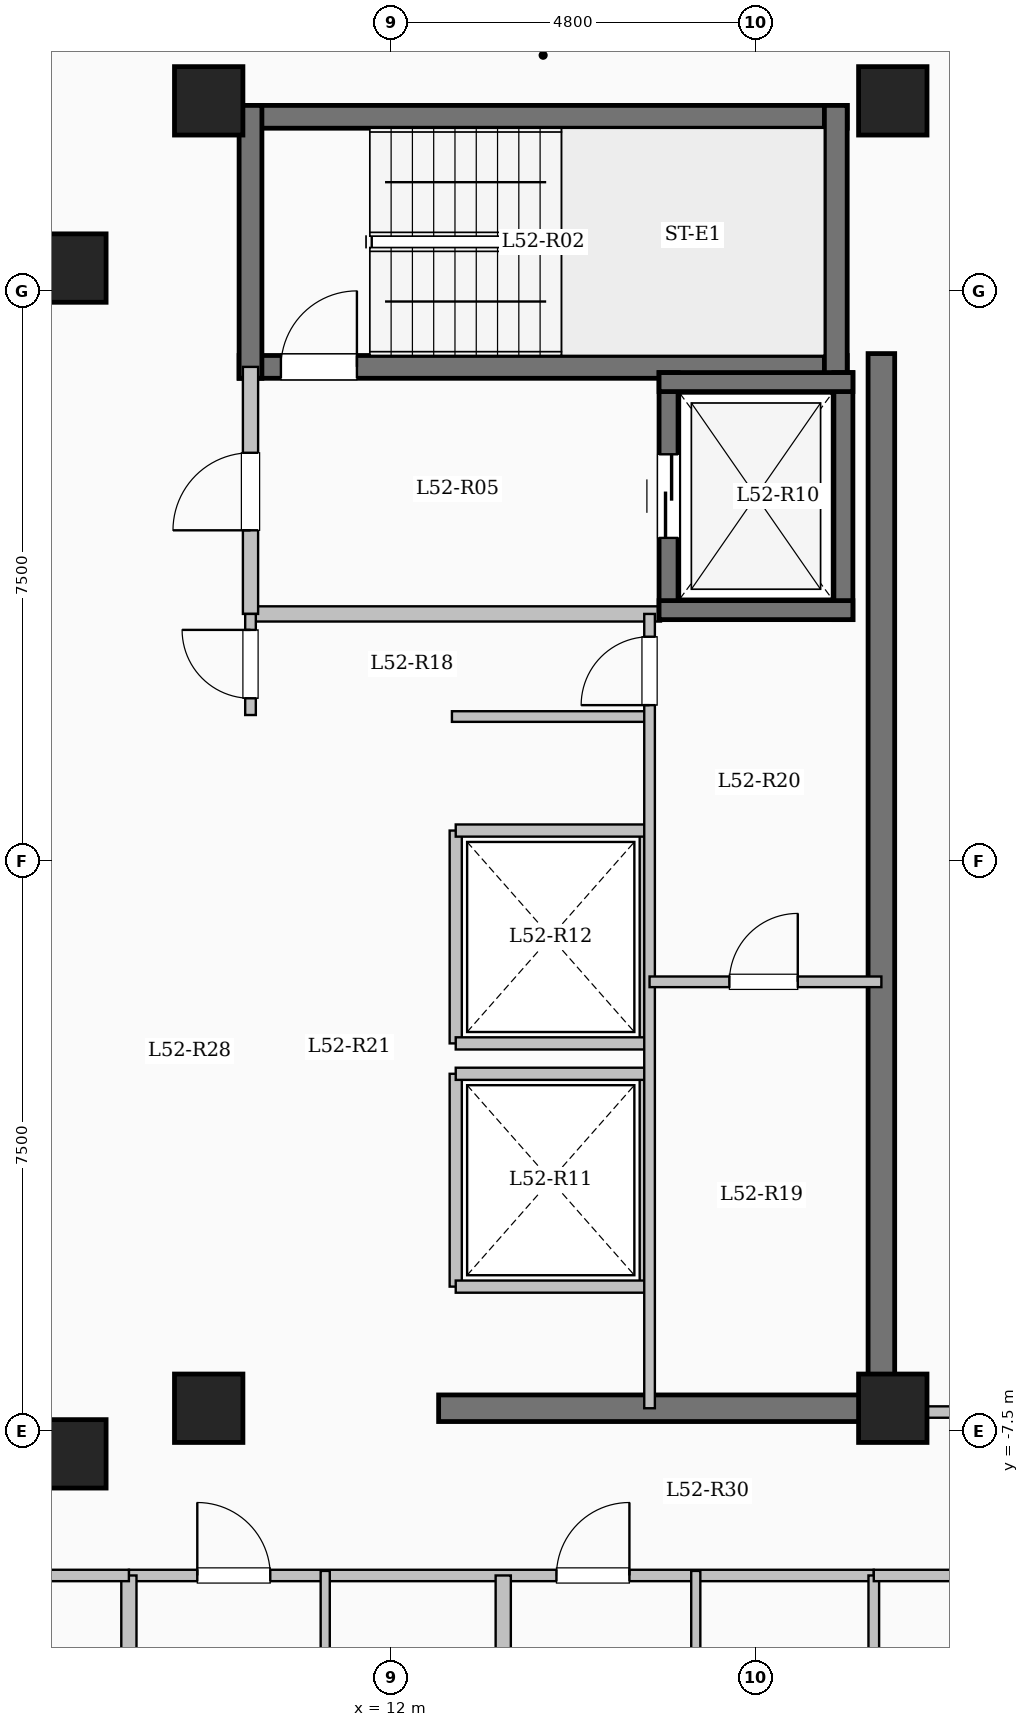
"""IFC4 building model, lengths in metres.
Left out: names, types, materials, properties, quantities, classifications, styles, units other than length and angle.
Written with IfcOpenShell. Run it as: python <this file> out.ifc"""

import sys

from ifc_helpers import new_model, si_unit, direction, frame, frame_2d, origin, origin_2d, place, context, subcontext, project, spatial, rectangle, extrude, element, fill, save


model = new_model("IFC4")
c1 = context("Model", 3, precision=1e-05, world=origin(), true_north=direction((0.0, 1.0)))
c2 = subcontext(c1, "Body", "Model", "MODEL_VIEW")
j1 = project(units=[si_unit("LENGTHUNIT", "METRE"), si_unit("PLANEANGLEUNIT", "RADIAN")], contexts=[c1])
p1 = place(None, origin())
s1 = spatial("IfcSite", under=j1, at=p1, CompositionType="ELEMENT")
p2 = place(p1, origin())
s2 = spatial("IfcBuilding", under=s1, at=p2, CompositionType="ELEMENT")
p3 = place(p2, frame((0.0, 0.0, 193.6)))
s3 = spatial("IfcBuildingStorey", under=s2, at=p3, CompositionType="ELEMENT", Elevation=193.6)
for number, where, z_axis, x_axis in (
    (1, (7.8, -7.8, 0.0), (0.0, 0.0, 1.0), (1.0, 0.0, 0.0)),
    (2, (7.8, 7.8, 0.0), (0.0, 0.0, 1.0), (1.0, 0.0, 0.0)),
    (3, (9.6, -7.2, 0.0), (0.0, 0.0, 1.0), (1.0, 0.0, 0.0)),
    (4, (9.6, 10.0, 0.0), (0.0, 0.0, 1.0), (1.0, 0.0, 0.0)),
    (5, (18.6, -7.2, 0.0), (0.0, 0.0, 1.0), (1.0, 0.0, 0.0)),
    (6, (18.6, 10.0, 0.0), (0.0, 0.0, 1.0), (1.0, 0.0, 0.0)),
):
    element("IfcColumn", number, at=place(p3, frame(where, z_axis=z_axis, x_axis=x_axis)), inside=s3, PredefinedType="COLUMN", context=c2, shape_type="SweptSolid", body=[
        extrude(rectangle(XDim=0.9, YDim=0.9, at=origin_2d()), origin(), (0.0, 0.0, 1.0), 3.35),
    ])
p4 = place(p3, frame((10.0, 9.79, 0.0), z_axis=(0.0, 0.0, 1.0), x_axis=(1.0, 0.0, 0.0)))
e7 = element("IfcWall", 7, at=p4, inside=s3, PredefinedType="SHEAR", context=c2, shape_type="SweptSolid", body=[
    extrude(rectangle(XDim=8.0, YDim=0.3, at=frame_2d((4.0, 0.0))), origin(), (0.0, 0.0, 1.0), 3.35),
])
p5 = place(p3, frame((10.0, 6.5, 0.0), z_axis=(0.0, 0.0, 1.0), x_axis=(1.0, 0.0, 0.0)))
e8 = element("IfcWall", 8, at=p5, inside=s3, PredefinedType="SHEAR", context=c2, shape_type="SweptSolid", body=[
    extrude(rectangle(XDim=8.0, YDim=0.3, at=frame_2d((4.0, 0.0))), origin(), (0.0, 0.0, 1.0), 3.35),
])
p6 = place(p5, frame((0.55, 0.0, 0.0)))
e9 = element("IfcOpeningElement", 9, at=p6, cuts=e8, PredefinedType="OPENING", context=c2, shape_type="SweptSolid", body=[
    extrude(rectangle(XDim=1.0, YDim=2.15, at=frame_2d((0.5, 1.075))), frame((0.0, 0.16, 0.0), z_axis=(0.0, -1.0, 0.0), x_axis=(1.0, 0.0, 0.0)), (0.0, 0.0, 1.0), 0.32),
])
for number, where, z_axis, x_axis in (
    (10, (10.15, 6.35, 0.0), (0.0, 0.0, 1.0), (0.0, 1.0, 0.0)),
    (11, (17.85, 6.35, 0.0), (0.0, 0.0, 1.0), (0.0, 1.0, 0.0)),
):
    element("IfcWall", number, at=place(p3, frame(where, z_axis=z_axis, x_axis=x_axis)), inside=s3, PredefinedType="SHEAR", context=c2, shape_type="SweptSolid", body=[
        extrude(rectangle(XDim=3.59, YDim=0.3, at=frame_2d((1.795, 0.0))), origin(), (0.0, 0.0, 1.0), 3.35),
    ])
p7 = place(p3, frame((10.15, 3.25, 0.0), z_axis=(0.0, 0.0, 1.0), x_axis=(1.0, 0.0, 0.0)))
e12 = element("IfcWall", 12, at=p7, inside=s3, PredefinedType="SOLIDWALL", context=c2, shape_type="SweptSolid", body=[
    extrude(rectangle(XDim=5.4, YDim=0.2, at=frame_2d((2.7, 0.0))), origin(), (0.0, 0.0, 1.0), 3.1),
])
p8 = place(p3, frame((10.15, 3.25, 0.0), z_axis=(0.0, 0.0, 1.0), x_axis=(0.0, 1.0, 0.0)))
e13 = element("IfcWall", 13, at=p8, inside=s3, PredefinedType="SOLIDWALL", context=c2, shape_type="SweptSolid", body=[
    extrude(rectangle(XDim=3.25, YDim=0.2, at=frame_2d((1.625, 0.0))), origin(), (0.0, 0.0, 1.0), 3.1),
])
p9 = place(p8, frame((1.1, 0.0, 0.0)))
e14 = element("IfcOpeningElement", 14, at=p9, cuts=e13, PredefinedType="OPENING", context=c2, shape_type="SweptSolid", body=[
    extrude(rectangle(XDim=1.02, YDim=2.15, at=frame_2d((0.51, 1.075))), frame((0.0, 0.11, 0.0), z_axis=(0.0, -1.0, 0.0), x_axis=(1.0, 0.0, 0.0)), (0.0, 0.0, 1.0), 0.22),
])
p10 = place(p3, frame((15.65, 3.175, 0.0), z_axis=(0.0, 0.0, 1.0), x_axis=(0.0, 1.0, 0.0)))
e15 = element("IfcWall", 15, at=p10, inside=s3, PredefinedType="SHEAR", context=c2, shape_type="SweptSolid", body=[
    extrude(rectangle(XDim=3.25, YDim=0.25, at=frame_2d((1.625, 0.0))), origin(), (0.0, 0.0, 1.0), 3.35),
])
p11 = place(p10, frame((1.075, 0.0, 0.0)))
e16 = element("IfcOpeningElement", 16, at=p11, cuts=e15, PredefinedType="OPENING", context=c2, shape_type="SweptSolid", body=[
    extrude(rectangle(XDim=1.1, YDim=2.15, at=frame_2d((0.55, 1.075))), frame((0.0, 0.135, 0.0), z_axis=(0.0, -1.0, 0.0), x_axis=(1.0, 0.0, 0.0)), (0.0, 0.0, 1.0), 0.27),
])
p12 = place(p3, frame((17.95, 3.175, 0.0), z_axis=(0.0, 0.0, 1.0), x_axis=(0.0, 1.0, 0.0)))
e17 = element("IfcWall", 17, at=p12, inside=s3, PredefinedType="SHEAR", context=c2, shape_type="SweptSolid", body=[
    extrude(rectangle(XDim=3.25, YDim=0.25, at=frame_2d((1.625, 0.0))), origin(), (0.0, 0.0, 1.0), 3.35),
])
for number, where, z_axis, x_axis in (
    (18, (15.525, 3.3, 0.0), (0.0, 0.0, 1.0), (1.0, 0.0, 0.0)),
    (19, (15.525, 6.3, 0.0), (0.0, 0.0, 1.0), (1.0, 0.0, 0.0)),
):
    element("IfcWall", number, at=place(p3, frame(where, z_axis=z_axis, x_axis=x_axis)), inside=s3, PredefinedType="SHEAR", context=c2, shape_type="SweptSolid", body=[
        extrude(rectangle(XDim=2.55, YDim=0.25, at=frame_2d((1.275, 0.0))), origin(), (0.0, 0.0, 1.0), 3.35),
    ])
for number, where, z_axis, x_axis in (
    (20, (12.85, -5.6, 0.0), (0.0, 0.0, 1.0), (0.0, 1.0, 0.0)),
    (21, (15.35, -5.6, 0.0), (0.0, 0.0, 1.0), (0.0, 1.0, 0.0)),
):
    element("IfcWall", number, at=place(p3, frame(where, z_axis=z_axis, x_axis=x_axis)), inside=s3, PredefinedType="SOLIDWALL", context=c2, shape_type="SweptSolid", body=[
        extrude(rectangle(XDim=2.8, YDim=0.16, at=frame_2d((1.4, 0.0))), origin(), (0.0, 0.0, 1.0), 3.1),
    ])
for number, where, z_axis, x_axis in (
    (22, (12.85, -5.6, 0.0), (0.0, 0.0, 1.0), (1.0, 0.0, 0.0)),
    (23, (12.85, -2.8, 0.0), (0.0, 0.0, 1.0), (1.0, 0.0, 0.0)),
):
    element("IfcWall", number, at=place(p3, frame(where, z_axis=z_axis, x_axis=x_axis)), inside=s3, PredefinedType="SOLIDWALL", context=c2, shape_type="SweptSolid", body=[
        extrude(rectangle(XDim=2.5, YDim=0.16, at=frame_2d((1.25, 0.0))), origin(), (0.0, 0.0, 1.0), 3.1),
    ])
for number, where, z_axis, x_axis in (
    (24, (12.85, -2.4, 0.0), (0.0, 0.0, 1.0), (0.0, 1.0, 0.0)),
    (25, (15.35, -2.4, 0.0), (0.0, 0.0, 1.0), (0.0, 1.0, 0.0)),
):
    element("IfcWall", number, at=place(p3, frame(where, z_axis=z_axis, x_axis=x_axis)), inside=s3, PredefinedType="SOLIDWALL", context=c2, shape_type="SweptSolid", body=[
        extrude(rectangle(XDim=2.8, YDim=0.16, at=frame_2d((1.4, 0.0))), origin(), (0.0, 0.0, 1.0), 3.1),
    ])
for number, where, z_axis, x_axis in (
    (26, (12.85, -2.4, 0.0), (0.0, 0.0, 1.0), (1.0, 0.0, 0.0)),
    (27, (12.85, 0.4, 0.0), (0.0, 0.0, 1.0), (1.0, 0.0, 0.0)),
):
    element("IfcWall", number, at=place(p3, frame(where, z_axis=z_axis, x_axis=x_axis)), inside=s3, PredefinedType="SOLIDWALL", context=c2, shape_type="SweptSolid", body=[
        extrude(rectangle(XDim=2.5, YDim=0.16, at=frame_2d((1.25, 0.0))), origin(), (0.0, 0.0, 1.0), 3.1),
    ])
p13 = place(p3, frame((18.45, -7.375, 0.0), z_axis=(0.0, 0.0, 1.0), x_axis=(0.0, 1.0, 0.0)))
e28 = element("IfcWall", 28, at=p13, inside=s3, PredefinedType="SHEAR", context=c2, shape_type="SweptSolid", body=[
    extrude(rectangle(XDim=14.05, YDim=0.35, at=frame_2d((7.025, 0.0))), origin(), (0.0, 0.0, 1.0), 3.35),
])
p14 = place(p3, frame((12.625, -7.2, 0.0), z_axis=(0.0, 0.0, 1.0), x_axis=(1.0, 0.0, 0.0)))
e29 = element("IfcWall", 29, at=p14, inside=s3, PredefinedType="SHEAR", context=c2, shape_type="SweptSolid", body=[
    extrude(rectangle(XDim=6.0, YDim=0.35, at=frame_2d((3.0, 0.0))), origin(), (0.0, 0.0, 1.0), 3.35),
])
p15 = place(p3, frame((12.8, 1.9, 0.0), z_axis=(0.0, 0.0, 1.0), x_axis=(1.0, 0.0, 0.0)))
e30 = element("IfcWall", 30, at=p15, inside=s3, PredefinedType="PARTITIONING", context=c2, shape_type="SweptSolid", body=[
    extrude(rectangle(XDim=2.6, YDim=0.14, at=frame_2d((1.3, 0.0))), origin(), (0.0, 0.0, 1.0), 3.1),
])
p16 = place(p3, frame((10.15, 1.92, 0.0), z_axis=(0.0, 0.0, 1.0), x_axis=(0.0, 1.0, 0.0)))
e31 = element("IfcWall", 31, at=p16, inside=s3, PredefinedType="PARTITIONING", context=c2, shape_type="SweptSolid", body=[
    extrude(rectangle(XDim=1.33, YDim=0.14, at=frame_2d((0.665, 0.0))), origin(), (0.0, 0.0, 1.0), 3.1),
])
p17 = place(p16, frame((0.22, 0.0, 0.0)))
e32 = element("IfcOpeningElement", 32, at=p17, cuts=e31, PredefinedType="OPENING", context=c2, shape_type="SweptSolid", body=[
    extrude(rectangle(XDim=0.9, YDim=2.08, at=frame_2d((0.45, 1.04))), frame((0.0, 0.08, 0.0), z_axis=(0.0, -1.0, 0.0), x_axis=(1.0, 0.0, 0.0)), (0.0, 0.0, 1.0), 0.16),
])
p18 = place(p3, frame((15.4, -7.2, 0.0), z_axis=(0.0, 0.0, 1.0), x_axis=(0.0, 1.0, 0.0)))
e33 = element("IfcWall", 33, at=p18, inside=s3, PredefinedType="PARTITIONING", context=c2, shape_type="SweptSolid", body=[
    extrude(rectangle(XDim=10.45, YDim=0.14, at=frame_2d((5.225, 0.0))), origin(), (0.0, 0.0, 1.0), 3.1),
])
p19 = place(p18, frame((9.25, 0.0, 0.0)))
e34 = element("IfcOpeningElement", 34, at=p19, cuts=e33, PredefinedType="OPENING", context=c2, shape_type="SweptSolid", body=[
    extrude(rectangle(XDim=0.9, YDim=2.08, at=frame_2d((0.45, 1.04))), frame((0.0, 0.08, 0.0), z_axis=(0.0, -1.0, 0.0), x_axis=(1.0, 0.0, 0.0)), (0.0, 0.0, 1.0), 0.16),
])
p20 = place(p3, frame((15.4, -1.59, 0.0), z_axis=(0.0, 0.0, 1.0), x_axis=(1.0, 0.0, 0.0)))
e35 = element("IfcWall", 35, at=p20, inside=s3, PredefinedType="PARTITIONING", context=c2, shape_type="SweptSolid", body=[
    extrude(rectangle(XDim=3.05, YDim=0.14, at=frame_2d((1.525, 0.0))), origin(), (0.0, 0.0, 1.0), 3.1),
])
p21 = place(p20, frame((1.05, 0.0, 0.0)))
e36 = element("IfcOpeningElement", 36, at=p21, cuts=e35, PredefinedType="OPENING", context=c2, shape_type="SweptSolid", body=[
    extrude(rectangle(XDim=0.9, YDim=2.08, at=frame_2d((0.45, 1.04))), frame((0.0, 0.08, 0.0), z_axis=(0.0, -1.0, 0.0), x_axis=(1.0, 0.0, 0.0)), (0.0, 0.0, 1.0), 0.16),
])
p22 = place(p3, frame((8.55, -9.4, 0.0), z_axis=(0.0, 0.0, 1.0), x_axis=(1.0, 0.0, 0.0)))
e37 = element("IfcWall", 37, at=p22, inside=s3, PredefinedType="PARTITIONING", context=c2, shape_type="SweptSolid", body=[
    extrude(rectangle(XDim=9.8, YDim=0.15, at=frame_2d((4.9, 0.0))), origin(), (0.0, 0.0, 1.0), 3.1),
])
p23 = place(p22, frame((0.9, 0.0, 0.0)))
e38 = element("IfcOpeningElement", 38, at=p23, cuts=e37, PredefinedType="OPENING", context=c2, shape_type="SweptSolid", body=[
    extrude(rectangle(XDim=0.96, YDim=2.15, at=frame_2d((0.48, 1.075))), frame((0.0, 0.085, 0.0), z_axis=(0.0, -1.0, 0.0), x_axis=(1.0, 0.0, 0.0)), (0.0, 0.0, 1.0), 0.17),
])
p24 = place(p22, frame((5.625, 0.0, 0.0)))
e39 = element("IfcOpeningElement", 39, at=p24, cuts=e37, PredefinedType="OPENING", context=c2, shape_type="SweptSolid", body=[
    extrude(rectangle(XDim=0.96, YDim=2.15, at=frame_2d((0.48, 1.075))), frame((0.0, 0.085, 0.0), z_axis=(0.0, -1.0, 0.0), x_axis=(1.0, 0.0, 0.0)), (0.0, 0.0, 1.0), 0.17),
])
p25 = place(p3, frame((13.475, -20.9, 0.0), z_axis=(0.0, 0.0, 1.0), x_axis=(0.0, 1.0, 0.0)))
e40 = element("IfcWall", 40, at=p25, inside=s3, PredefinedType="SOLIDWALL", context=c2, shape_type="SweptSolid", body=[
    extrude(rectangle(XDim=11.5, YDim=0.2, at=frame_2d((5.75, 0.0))), origin(), (0.0, 0.0, 1.0), 3.1),
])
p26 = place(p3, frame((11.133, -12.56, 0.0), z_axis=(0.0, 0.0, 1.0), x_axis=(0.0, 1.0, 0.0)))
e41 = element("IfcWall", 41, at=p26, inside=s3, PredefinedType="PARTITIONING", context=c2, shape_type="SweptSolid", body=[
    extrude(rectangle(XDim=3.22, YDim=0.12, at=frame_2d((1.61, 0.0))), origin(), (0.0, 0.0, 1.0), 3.1),
])
p27 = place(p26, frame((1.14, 0.0, 0.0)))
e42 = element("IfcOpeningElement", 42, at=p27, cuts=e41, PredefinedType="OPENING", context=c2, shape_type="SweptSolid", body=[
    extrude(rectangle(XDim=0.88, YDim=2.1, at=frame_2d((0.44, 1.05))), frame((0.0, 0.07, 0.0), z_axis=(0.0, -1.0, 0.0), x_axis=(1.0, 0.0, 0.0)), (0.0, 0.0, 1.0), 0.14),
])
p28 = place(p3, frame((16.008, -12.56, 0.0), z_axis=(0.0, 0.0, 1.0), x_axis=(0.0, 1.0, 0.0)))
e43 = element("IfcWall", 43, at=p28, inside=s3, PredefinedType="PARTITIONING", context=c2, shape_type="SweptSolid", body=[
    extrude(rectangle(XDim=3.22, YDim=0.12, at=frame_2d((1.61, 0.0))), origin(), (0.0, 0.0, 1.0), 3.1),
])
p29 = place(p28, frame((1.14, 0.0, 0.0)))
e44 = element("IfcOpeningElement", 44, at=p29, cuts=e43, PredefinedType="OPENING", context=c2, shape_type="SweptSolid", body=[
    extrude(rectangle(XDim=0.88, YDim=2.1, at=frame_2d((0.44, 1.05))), frame((0.0, 0.07, 0.0), z_axis=(0.0, -1.0, 0.0), x_axis=(1.0, 0.0, 0.0)), (0.0, 0.0, 1.0), 0.14),
])
p30 = place(p3, frame((8.55, -21.504, 0.0), z_axis=(0.0, 0.0, 1.0), x_axis=(0.0, 1.0, 0.0)))
e45 = element("IfcWall", 45, at=p30, inside=s3, PredefinedType="SOLIDWALL", context=c2, shape_type="SweptSolid", body=[
    extrude(rectangle(XDim=12.104, YDim=0.2, at=frame_2d((6.052, 0.0))), origin(), (0.0, 0.0, 1.0), 3.1),
])
p31 = place(p3, frame((-8.55, -9.4, 0.0), z_axis=(0.0, 0.0, 1.0), x_axis=(1.0, 0.0, 0.0)))
e46 = element("IfcWall", 46, at=p31, inside=s3, PredefinedType="PARTITIONING", context=c2, shape_type="SweptSolid", body=[
    extrude(rectangle(XDim=17.1, YDim=0.15, at=frame_2d((8.55, 0.0))), origin(), (0.0, 0.0, 1.0), 3.1),
])
p32 = place(p31, frame((1.9, 0.0, 0.0)))
e47 = element("IfcOpeningElement", 47, at=p32, cuts=e46, PredefinedType="OPENING", context=c2, shape_type="SweptSolid", body=[
    extrude(rectangle(XDim=0.95, YDim=2.15, at=frame_2d((0.475, 1.075))), frame((0.0, 0.085, 0.0), z_axis=(0.0, -1.0, 0.0), x_axis=(1.0, 0.0, 0.0)), (0.0, 0.0, 1.0), 0.17),
])
p33 = place(p31, frame((10.5, 0.0, 0.0)))
e48 = element("IfcOpeningElement", 48, at=p33, cuts=e46, PredefinedType="OPENING", context=c2, shape_type="SweptSolid", body=[
    extrude(rectangle(XDim=0.95, YDim=2.15, at=frame_2d((0.475, 1.075))), frame((0.0, 0.085, 0.0), z_axis=(0.0, -1.0, 0.0), x_axis=(1.0, 0.0, 0.0)), (0.0, 0.0, 1.0), 0.17),
])
p34 = place(p3, frame((18.45, -7.25, 0.0), z_axis=(0.0, 0.0, 1.0), x_axis=(1.0, 0.0, 0.0)))
e49 = element("IfcWall", 49, at=p34, inside=s3, PredefinedType="PARTITIONING", context=c2, shape_type="SweptSolid", body=[
    extrude(rectangle(XDim=5.13, YDim=0.15, at=frame_2d((2.565, 0.0))), origin(), (0.0, 0.0, 1.0), 3.1),
])
p35 = place(p34, frame((1.95, 0.0, 0.0)))
e50 = element("IfcOpeningElement", 50, at=p35, cuts=e49, PredefinedType="OPENING", context=c2, shape_type="SweptSolid", body=[
    extrude(rectangle(XDim=1.08, YDim=2.15, at=frame_2d((0.54, 1.075))), frame((0.0, 0.085, 0.0), z_axis=(0.0, -1.0, 0.0), x_axis=(1.0, 0.0, 0.0)), (0.0, 0.0, 1.0), 0.17),
])
p36 = place(p3, frame((18.35, -17.25, 0.0), z_axis=(0.0, 0.0, 1.0), x_axis=(0.0, 1.0, 0.0)))
e51 = element("IfcWall", 51, at=p36, inside=s3, PredefinedType="PARTITIONING", context=c2, shape_type="SweptSolid", body=[
    extrude(rectangle(XDim=7.85, YDim=0.14, at=frame_2d((3.925, 0.0))), origin(), (0.0, 0.0, 1.0), 3.1),
])
p37 = place(p3, frame((18.35, -9.4, 0.0), z_axis=(0.0, 0.0, 1.0), x_axis=(1.0, 0.0, 0.0)))
e52 = element("IfcWall", 52, at=p37, inside=s3, PredefinedType="PARTITIONING", context=c2, shape_type="SweptSolid", body=[
    extrude(rectangle(XDim=5.23, YDim=0.15, at=frame_2d((2.615, 0.0))), origin(), (0.0, 0.0, 1.0), 3.1),
])
p38 = place(p37, frame((2.14, 0.0, 0.0)))
e53 = element("IfcOpeningElement", 53, at=p38, cuts=e52, PredefinedType="OPENING", context=c2, shape_type="SweptSolid", body=[
    extrude(rectangle(XDim=0.95, YDim=2.15, at=frame_2d((0.475, 1.075))), frame((0.0, 0.085, 0.0), z_axis=(0.0, -1.0, 0.0), x_axis=(1.0, 0.0, 0.0)), (0.0, 0.0, 1.0), 0.17),
])
p39 = place(p6, origin())
e54 = element("IfcDoor", 54, at=p39, inside=s3, OperationType="SINGLE_SWING_RIGHT", PredefinedType="DOOR", context=c2, shape_type="SweptSolid", body=[
    extrude(rectangle(XDim=1.0, YDim=2.15, at=frame_2d((0.5, 1.075))), frame((0.0, 0.025, 0.0), z_axis=(0.0, -1.0, 0.0), x_axis=(1.0, 0.0, 0.0)), (0.0, 0.0, 1.0), 0.05),
])
fill(e9, e54)
p40 = place(p9, origin())
e55 = element("IfcDoor", 55, at=p40, inside=s3, OperationType="SINGLE_SWING_LEFT", PredefinedType="DOOR", context=c2, shape_type="SweptSolid", body=[
    extrude(rectangle(XDim=1.02, YDim=2.15, at=frame_2d((0.51, 1.075))), frame((0.0, 0.025, 0.0), z_axis=(0.0, -1.0, 0.0), x_axis=(1.0, 0.0, 0.0)), (0.0, 0.0, 1.0), 0.05),
])
fill(e14, e55)
p41 = place(p11, origin())
e56 = element("IfcDoor", 56, at=p41, inside=s3, OperationType="SLIDING_TO_LEFT", PredefinedType="DOOR", context=c2, shape_type="SweptSolid", body=[
    extrude(rectangle(XDim=1.1, YDim=2.15, at=frame_2d((0.55, 1.075))), frame((0.0, 0.025, 0.0), z_axis=(0.0, -1.0, 0.0), x_axis=(1.0, 0.0, 0.0)), (0.0, 0.0, 1.0), 0.05),
])
fill(e16, e56)
p42 = place(p17, origin())
e57 = element("IfcDoor", 57, at=p42, inside=s3, OperationType="SINGLE_SWING_RIGHT", PredefinedType="DOOR", context=c2, shape_type="SweptSolid", body=[
    extrude(rectangle(XDim=0.9, YDim=2.08, at=frame_2d((0.45, 1.04))), frame((0.0, 0.025, 0.0), z_axis=(0.0, -1.0, 0.0), x_axis=(1.0, 0.0, 0.0)), (0.0, 0.0, 1.0), 0.05),
])
fill(e32, e57)
p43 = place(p19, origin())
e58 = element("IfcDoor", 58, at=p43, inside=s3, OperationType="SINGLE_SWING_LEFT", PredefinedType="DOOR", context=c2, shape_type="SweptSolid", body=[
    extrude(rectangle(XDim=0.9, YDim=2.08, at=frame_2d((0.45, 1.04))), frame((0.0, 0.025, 0.0), z_axis=(0.0, -1.0, 0.0), x_axis=(1.0, 0.0, 0.0)), (0.0, 0.0, 1.0), 0.05),
])
fill(e34, e58)
p44 = place(p21, origin())
e59 = element("IfcDoor", 59, at=p44, inside=s3, OperationType="SINGLE_SWING_RIGHT", PredefinedType="DOOR", context=c2, shape_type="SweptSolid", body=[
    extrude(rectangle(XDim=0.9, YDim=2.08, at=frame_2d((0.45, 1.04))), frame((0.0, 0.025, 0.0), z_axis=(0.0, -1.0, 0.0), x_axis=(1.0, 0.0, 0.0)), (0.0, 0.0, 1.0), 0.05),
])
fill(e36, e59)
p45 = place(p23, origin())
e60 = element("IfcDoor", 60, at=p45, inside=s3, OperationType="SINGLE_SWING_LEFT", PredefinedType="DOOR", context=c2, shape_type="SweptSolid", body=[
    extrude(rectangle(XDim=0.96, YDim=2.15, at=frame_2d((0.48, 1.075))), frame((0.0, 0.025, 0.0), z_axis=(0.0, -1.0, 0.0), x_axis=(1.0, 0.0, 0.0)), (0.0, 0.0, 1.0), 0.05),
])
fill(e38, e60)
p46 = place(p24, origin())
e61 = element("IfcDoor", 61, at=p46, inside=s3, OperationType="SINGLE_SWING_RIGHT", PredefinedType="DOOR", context=c2, shape_type="SweptSolid", body=[
    extrude(rectangle(XDim=0.96, YDim=2.15, at=frame_2d((0.48, 1.075))), frame((0.0, 0.025, 0.0), z_axis=(0.0, -1.0, 0.0), x_axis=(1.0, 0.0, 0.0)), (0.0, 0.0, 1.0), 0.05),
])
fill(e39, e61)
save(model, sys.argv[1])
